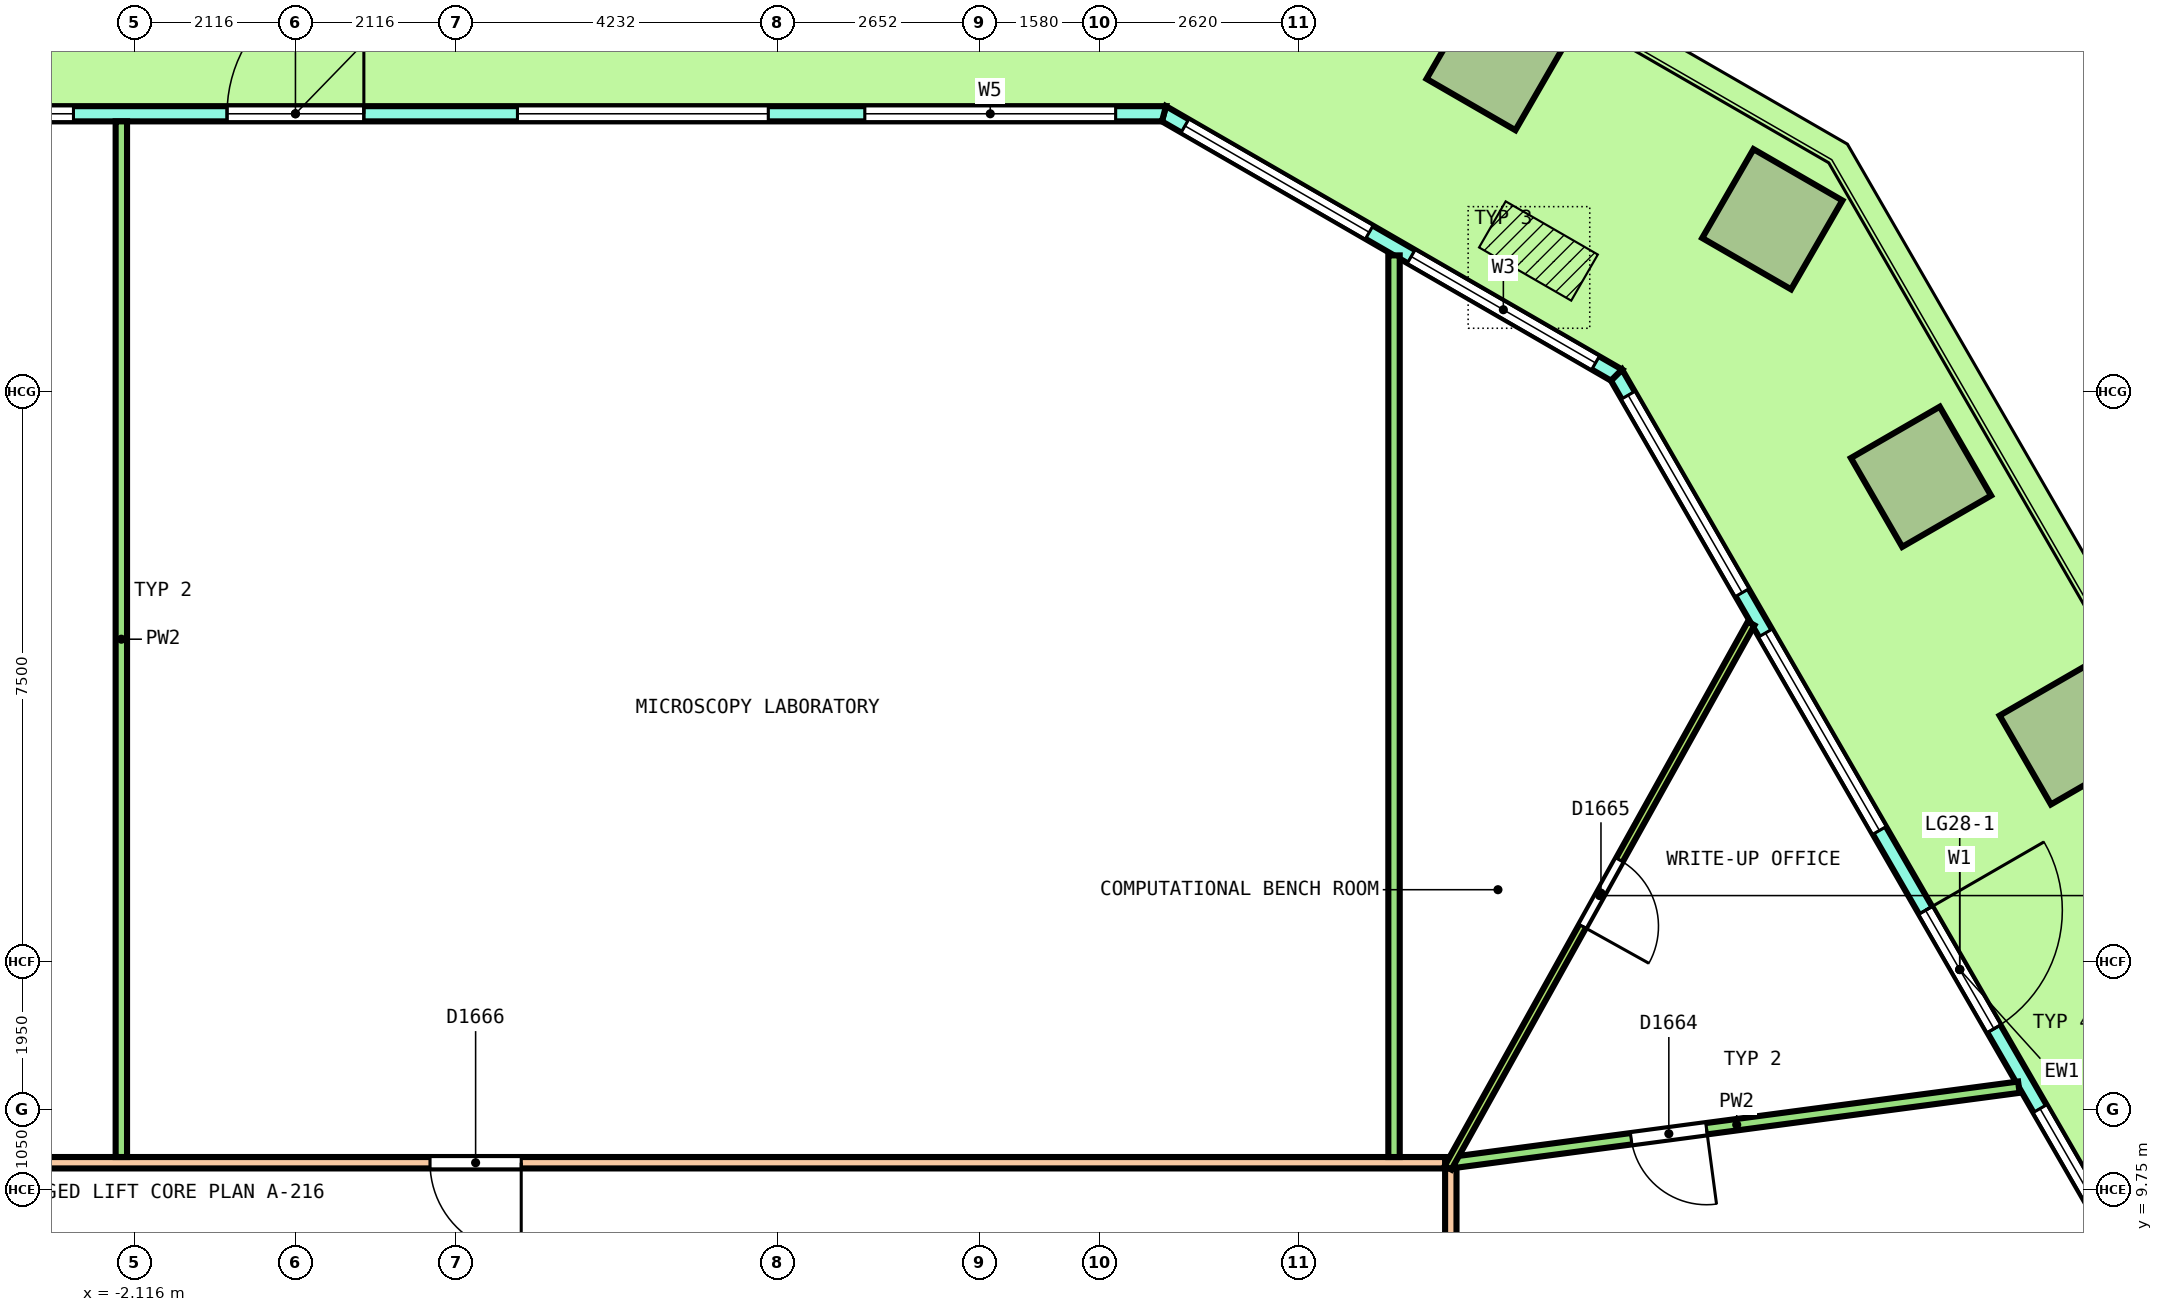
"""IFC4 building model, lengths in metres.
Left out: names, types, materials, properties, quantities, classifications, styles, units other than length and angle.
Written with IfcOpenShell. Run it as: python <this file> out.ifc"""

import sys

from ifc_helpers import new_model, si_unit, direction, frame, frame_2d, origin, origin_2d, place, context, subcontext, project, spatial, polyline, rectangle, outline, extrude, element, fill, save


model = new_model("IFC4")
c1 = context("Model", 3, precision=1e-05, world=origin(), true_north=direction((0.0, 1.0)))
c2 = subcontext(c1, "Body", "Model", "MODEL_VIEW")
j1 = project(units=[si_unit("LENGTHUNIT", "METRE"), si_unit("PLANEANGLEUNIT", "RADIAN")], contexts=[c1])
p1 = place(None, origin())
s1 = spatial("IfcSite", under=j1, at=p1, CompositionType="ELEMENT")
p2 = place(p1, origin())
s2 = spatial("IfcBuilding", under=s1, at=p2, CompositionType="ELEMENT")
p3 = place(p2, frame((0.0, 0.0, 130.8)))
s3 = spatial("IfcBuildingStorey", under=s2, at=p3, CompositionType="ELEMENT", Elevation=130.8)
for number, where, z_axis, x_axis in (
    (1, (23.342, 15.736, 0.0), (0.0, 0.0, 1.0), (-0.5, 0.866, 0.0)),
    (2, (21.386, 19.124, 0.0), (0.0, 0.0, 1.0), (-0.5, 0.866, 0.0)),
    (3, (19.43, 22.512, 0.0), (0.0, 0.0, 1.0), (-0.866, 0.5, 0.0)),
    (4, (15.803, 24.606, 0.0), (0.0, 0.0, 1.0), (-0.866, 0.5, 0.0)),
):
    element("IfcColumn", number, at=place(p3, frame(where, z_axis=z_axis, x_axis=x_axis)), inside=s3, PredefinedType="COLUMN", context=c2, shape_type="SweptSolid", body=[
        extrude(rectangle(XDim=1.35, YDim=1.35, at=origin_2d()), origin(), (0.0, 0.0, 1.0), 4.04),
    ])
p4 = place(p3, frame((26.411, 4.82, 0.0), z_axis=(0.0, 0.0, 1.0), x_axis=(-0.500000137386, 0.866025324465, 0.0)))
e5 = element("IfcWall", 5, at=p4, inside=s3, PredefinedType="SOLIDWALL", context=c2, shape_type="SweptSolid", body=[
    extrude(outline(polyline([(-0.027, -0.1), (0.979, -0.1), (1.986, -0.1), (2.992, -0.1), (3.999, -0.1), (5.005, -0.1), (6.012, -0.1), (7.018, -0.1), (8.025, -0.1), (9.031, -0.1), (10.038, -0.1), (11.044, -0.1), (12.051, -0.1), (13.057, -0.1), (14.063, -0.1), (15.07, -0.1), (16.076, -0.1), (17.083, -0.1), (18.089, -0.1), (18.036, 0.1), (17.035, 0.1), (16.035, 0.1), (15.034, 0.1), (14.034, 0.1), (13.033, 0.1), (12.033, 0.1), (11.032, 0.1), (10.032, 0.1), (9.031, 0.1), (8.031, 0.1), (7.03, 0.1), (6.03, 0.1), (5.029, 0.1), (4.029, 0.1), (3.028, 0.1), (2.028, 0.1), (1.027, 0.1), (0.027, 0.1), (-0.027, -0.1)])), origin(), (0.0, 0.0, 1.0), 4.1),
])
p5 = place(p4, frame((0.306, 0.0, 0.1)))
e6 = element("IfcOpeningElement", 6, at=p5, cuts=e5, PredefinedType="OPENING", context=c2, shape_type="SweptSolid", body=[
    extrude(rectangle(XDim=3.0, YDim=2.9, at=frame_2d((1.5, 1.45))), frame((0.0, 0.11, 0.0), z_axis=(0.0, -1.0, 0.0), x_axis=(1.0, 0.0, 0.0)), (0.0, 0.0, 1.0), 0.22),
])
p6 = place(p4, frame((3.919, 0.0, 0.1)))
e7 = element("IfcOpeningElement", 7, at=p6, cuts=e5, PredefinedType="OPENING", context=c2, shape_type="SweptSolid", body=[
    extrude(rectangle(XDim=3.0, YDim=2.9, at=frame_2d((1.5, 1.45))), frame((0.0, 0.11, 0.0), z_axis=(0.0, -1.0, 0.0), x_axis=(1.0, 0.0, 0.0)), (0.0, 0.0, 1.0), 0.22),
])
p7 = place(p4, frame((8.131, 0.0, 0.0)))
e8 = element("IfcOpeningElement", 8, at=p7, cuts=e5, PredefinedType="OPENING", context=c2, shape_type="SweptSolid", body=[
    extrude(rectangle(XDim=1.8, YDim=2.4, at=frame_2d((0.9, 1.2))), frame((0.0, 0.11, 0.0), z_axis=(0.0, -1.0, 0.0), x_axis=(1.0, 0.0, 0.0)), (0.0, 0.0, 1.0), 0.22),
])
p8 = place(p4, frame((8.131, 0.0, 2.55)))
e9 = element("IfcOpeningElement", 9, at=p8, cuts=e5, PredefinedType="OPENING", context=c2, shape_type="SweptSolid", body=[
    extrude(rectangle(XDim=1.8, YDim=0.45, at=frame_2d((0.9, 0.225))), frame((0.0, 0.11, 0.0), z_axis=(0.0, -1.0, 0.0), x_axis=(1.0, 0.0, 0.0)), (0.0, 0.0, 1.0), 0.22),
])
p9 = place(p4, frame((11.144, 0.0, 0.1)))
e10 = element("IfcOpeningElement", 10, at=p9, cuts=e5, PredefinedType="OPENING", context=c2, shape_type="SweptSolid", body=[
    extrude(rectangle(XDim=3.0, YDim=2.9, at=frame_2d((1.5, 1.45))), frame((0.0, 0.11, 0.0), z_axis=(0.0, -1.0, 0.0), x_axis=(1.0, 0.0, 0.0)), (0.0, 0.0, 1.0), 0.22),
])
p10 = place(p4, frame((14.756, 0.0, 0.1)))
e11 = element("IfcOpeningElement", 11, at=p10, cuts=e5, PredefinedType="OPENING", context=c2, shape_type="SweptSolid", body=[
    extrude(rectangle(XDim=3.0, YDim=2.9, at=frame_2d((1.5, 1.45))), frame((0.0, 0.11, 0.0), z_axis=(0.0, -1.0, 0.0), x_axis=(1.0, 0.0, 0.0)), (0.0, 0.0, 1.0), 0.22),
])
p11 = place(p3, frame((17.38, 20.463, 0.0), z_axis=(0.0, 0.0, 1.0), x_axis=(-0.866029458321, 0.49999297727, 0.0)))
e12 = element("IfcWall", 12, at=p11, inside=s3, PredefinedType="SOLIDWALL", context=c2, shape_type="SweptSolid", body=[
    extrude(outline(polyline([(-0.027, -0.1), (1.128, -0.1), (2.282, -0.1), (3.437, -0.1), (4.592, -0.1), (5.747, -0.1), (6.901, -0.1), (6.848, 0.1), (5.711, 0.1), (4.574, 0.1), (3.437, 0.1), (2.301, 0.1), (1.164, 0.1), (0.027, 0.1), (-0.027, -0.1)])), origin(), (0.0, 0.0, 1.0), 4.1),
])
p12 = place(p11, frame((0.319, 0.0, 0.1)))
e13 = element("IfcOpeningElement", 13, at=p12, cuts=e12, PredefinedType="OPENING", context=c2, shape_type="SweptSolid", body=[
    extrude(rectangle(XDim=2.8, YDim=2.9, at=frame_2d((1.4, 1.45))), frame((0.0, 0.11, 0.0), z_axis=(0.0, -1.0, 0.0), x_axis=(1.0, 0.0, 0.0)), (0.0, 0.0, 1.0), 0.22),
])
p13 = place(p11, frame((3.756, 0.0, 0.1)))
e14 = element("IfcOpeningElement", 14, at=p13, cuts=e12, PredefinedType="OPENING", context=c2, shape_type="SweptSolid", body=[
    extrude(rectangle(XDim=2.8, YDim=2.9, at=frame_2d((1.4, 1.45))), frame((0.0, 0.11, 0.0), z_axis=(0.0, -1.0, 0.0), x_axis=(1.0, 0.0, 0.0)), (0.0, 0.0, 1.0), 0.22),
])
p14 = place(p3, frame((11.426, 23.9, 0.0), z_axis=(0.0, 0.0, 1.0), x_axis=(-1.0, 0.0, 0.0)))
e15 = element("IfcWall", 15, at=p14, inside=s3, PredefinedType="SOLIDWALL", context=c2, shape_type="SweptSolid", body=[
    extrude(outline(polyline([(-0.027, -0.1), (1.014, -0.1), (2.055, -0.1), (3.097, -0.1), (4.138, -0.1), (5.179, -0.1), (6.22, -0.1), (7.261, -0.1), (8.303, -0.1), (9.344, -0.1), (10.385, -0.1), (11.426, -0.1), (12.468, -0.1), (13.509, -0.1), (14.55, -0.1), (15.591, -0.1), (16.632, -0.1), (17.673, -0.1), (18.715, -0.1), (19.756, -0.1), (20.797, -0.1), (21.838, -0.1), (22.879, -0.1), (22.826, 0.1), (21.789, 0.1), (20.753, 0.1), (19.717, 0.1), (18.68, 0.1), (17.644, 0.1), (16.608, 0.1), (15.572, 0.1), (14.535, 0.1), (13.499, 0.1), (12.463, 0.1), (11.426, 0.1), (10.39, 0.1), (9.354, 0.1), (8.317, 0.1), (7.281, 0.1), (6.245, 0.1), (5.208, 0.1), (4.172, 0.1), (3.136, 0.1), (2.099, 0.1), (1.063, 0.1), (0.027, 0.1), (-0.027, -0.1)])), origin(), (0.0, 0.0, 1.0), 4.1),
])
p15 = place(p14, frame((0.635, 0.0, 0.1)))
e16 = element("IfcOpeningElement", 16, at=p15, cuts=e15, PredefinedType="OPENING", context=c2, shape_type="SweptSolid", body=[
    extrude(rectangle(XDim=3.3, YDim=2.9, at=frame_2d((1.65, 1.45))), frame((0.0, 0.11, 0.0), z_axis=(0.0, -1.0, 0.0), x_axis=(1.0, 0.0, 0.0)), (0.0, 0.0, 1.0), 0.22),
])
p16 = place(p14, frame((5.206, 0.0, 0.1)))
e17 = element("IfcOpeningElement", 17, at=p16, cuts=e15, PredefinedType="OPENING", context=c2, shape_type="SweptSolid", body=[
    extrude(rectangle(XDim=3.3, YDim=2.9, at=frame_2d((1.65, 1.45))), frame((0.0, 0.11, 0.0), z_axis=(0.0, -1.0, 0.0), x_axis=(1.0, 0.0, 0.0)), (0.0, 0.0, 1.0), 0.22),
])
p17 = place(p14, frame((10.526, 0.0, 0.0)))
e18 = element("IfcOpeningElement", 18, at=p17, cuts=e15, PredefinedType="OPENING", context=c2, shape_type="SweptSolid", body=[
    extrude(rectangle(XDim=1.8, YDim=2.4, at=frame_2d((0.9, 1.2))), frame((0.0, 0.11, 0.0), z_axis=(0.0, -1.0, 0.0), x_axis=(1.0, 0.0, 0.0)), (0.0, 0.0, 1.0), 0.22),
])
p18 = place(p14, frame((10.526, 0.0, 2.55)))
e19 = element("IfcOpeningElement", 19, at=p18, cuts=e15, PredefinedType="OPENING", context=c2, shape_type="SweptSolid", body=[
    extrude(rectangle(XDim=1.8, YDim=0.45, at=frame_2d((0.9, 0.225))), frame((0.0, 0.11, 0.0), z_axis=(0.0, -1.0, 0.0), x_axis=(1.0, 0.0, 0.0)), (0.0, 0.0, 1.0), 0.22),
])
p19 = place(p14, frame((14.347, 0.0, 0.1)))
e20 = element("IfcOpeningElement", 20, at=p19, cuts=e15, PredefinedType="OPENING", context=c2, shape_type="SweptSolid", body=[
    extrude(rectangle(XDim=3.3, YDim=2.9, at=frame_2d((1.65, 1.45))), frame((0.0, 0.11, 0.0), z_axis=(0.0, -1.0, 0.0), x_axis=(1.0, 0.0, 0.0)), (0.0, 0.0, 1.0), 0.22),
])
p20 = place(p14, frame((18.917, 0.0, 0.1)))
e21 = element("IfcOpeningElement", 21, at=p20, cuts=e15, PredefinedType="OPENING", context=c2, shape_type="SweptSolid", body=[
    extrude(rectangle(XDim=3.3, YDim=2.9, at=frame_2d((1.65, 1.45))), frame((0.0, 0.11, 0.0), z_axis=(0.0, -1.0, 0.0), x_axis=(1.0, 0.0, 0.0)), (0.0, 0.0, 1.0), 0.22),
])
p21 = place(p3, frame((15.2, 0.576, 0.0), z_axis=(0.0, 0.0, 1.0), x_axis=(0.0, 1.0, 0.0)))
e22 = element("IfcWall", 22, at=p21, inside=s3, PredefinedType="PARTITIONING", context=c2, shape_type="SweptSolid", body=[
    extrude(rectangle(XDim=9.449, YDim=0.15, at=frame_2d((4.725, 0.0))), origin(), (0.0, 0.0, 1.0), 3.05),
])
p22 = place(p3, frame((-15.125, 10.1, 0.0), z_axis=(0.0, 0.0, 1.0), x_axis=(1.0, 0.0, 0.0)))
e23 = element("IfcWall", 23, at=p22, inside=s3, PredefinedType="PARTITIONING", context=c2, shape_type="SweptSolid", body=[
    extrude(rectangle(XDim=30.25, YDim=0.15, at=frame_2d((15.125, 0.0))), origin(), (0.0, 0.0, 1.0), 3.05),
])
p23 = place(p22, frame((16.895, 0.0, 0.0)))
e24 = element("IfcOpeningElement", 24, at=p23, cuts=e23, PredefinedType="OPENING", context=c2, shape_type="SweptSolid", body=[
    extrude(rectangle(XDim=1.2, YDim=2.1, at=frame_2d((0.6, 1.05))), frame((0.0, 0.085, 0.0), z_axis=(0.0, -1.0, 0.0), x_axis=(1.0, 0.0, 0.0)), (0.0, 0.0, 1.0), 0.17),
])
p24 = place(p22, frame((6.564, 0.0, 0.0)))
e25 = element("IfcOpeningElement", 25, at=p24, cuts=e23, PredefinedType="OPENING", context=c2, shape_type="SweptSolid", body=[
    extrude(rectangle(XDim=1.2, YDim=2.1, at=frame_2d((0.6, 1.05))), frame((0.0, 0.085, 0.0), z_axis=(0.0, -1.0, 0.0), x_axis=(1.0, 0.0, 0.0)), (0.0, 0.0, 1.0), 0.17),
])
p25 = place(p22, frame((1.476, 0.0, 0.0)))
e26 = element("IfcOpeningElement", 26, at=p25, cuts=e23, PredefinedType="OPENING", context=c2, shape_type="SweptSolid", body=[
    extrude(rectangle(XDim=1.2, YDim=2.1, at=frame_2d((0.6, 1.05))), frame((0.0, 0.085, 0.0), z_axis=(0.0, -1.0, 0.0), x_axis=(1.0, 0.0, 0.0)), (0.0, 0.0, 1.0), 0.17),
])
p26 = place(p3, frame((15.25, 10.107, 0.0), z_axis=(0.0, 0.0, 1.0), x_axis=(0.991272259153, 0.131830604315, 0.0)))
e27 = element("IfcWall", 27, at=p26, inside=s3, PredefinedType="PARTITIONING", context=c2, shape_type="SweptSolid", body=[
    extrude(rectangle(XDim=7.489, YDim=0.15, at=frame_2d((3.745, 0.0))), origin(), (0.0, 0.0, 1.0), 3.05),
])
p27 = place(p26, frame((2.344, 0.0, 0.0)))
e28 = element("IfcOpeningElement", 28, at=p27, cuts=e27, PredefinedType="OPENING", context=c2, shape_type="SweptSolid", body=[
    extrude(rectangle(XDim=1.0, YDim=2.1, at=frame_2d((0.5, 1.05))), frame((0.0, 0.085, 0.0), z_axis=(0.0, -1.0, 0.0), x_axis=(1.0, 0.0, 0.0)), (0.0, 0.0, 1.0), 0.17),
])
p28 = place(p3, frame((14.453, 10.175, 0.0), z_axis=(0.0, 0.0, 1.0), x_axis=(0.0, 1.0, 0.0)))
e29 = element("IfcWall", 29, at=p28, inside=s3, PredefinedType="PARTITIONING", context=c2, shape_type="SweptSolid", body=[
    extrude(rectangle(XDim=11.862, YDim=0.15, at=frame_2d((5.931, 0.0))), origin(), (0.0, 0.0, 1.0), 3.05),
])
p29 = place(p3, frame((-2.291, 10.175, 0.0), z_axis=(0.0, 0.0, 1.0), x_axis=(0.0, 1.0, 0.0)))
e30 = element("IfcWall", 30, at=p29, inside=s3, PredefinedType="PARTITIONING", context=c2, shape_type="SweptSolid", body=[
    extrude(rectangle(XDim=13.625, YDim=0.15, at=frame_2d((6.812, 0.0))), origin(), (0.0, 0.0, 1.0), 3.05),
])
p30 = place(p3, frame((15.164, 10.034, 0.0), z_axis=(0.0, 0.0, 1.0), x_axis=(0.486568356271, 0.873642509655, 0.0)))
e31 = element("IfcWall", 31, at=p30, inside=s3, PredefinedType="PARTITIONING", context=c2, shape_type="SweptSolid", body=[
    extrude(rectangle(XDim=8.196, YDim=0.1, at=frame_2d((4.098, 0.0))), origin(), (0.0, 0.0, 1.0), 3.05),
])
p31 = place(p30, frame((3.635, 0.0, 0.0)))
e32 = element("IfcOpeningElement", 32, at=p31, cuts=e31, PredefinedType="OPENING", context=c2, shape_type="SweptSolid", body=[
    extrude(rectangle(XDim=1.0, YDim=2.1, at=frame_2d((0.5, 1.05))), frame((0.0, 0.06, 0.0), z_axis=(0.0, -1.0, 0.0), x_axis=(1.0, 0.0, 0.0)), (0.0, 0.0, 1.0), 0.12),
])
p32 = place(p6, origin())
e33 = element("IfcWindow", 33, at=p32, inside=s3, PartitioningType="SINGLE_PANEL", PredefinedType="WINDOW", context=c2, shape_type="SweptSolid", body=[
    extrude(rectangle(XDim=3.0, YDim=2.9, at=frame_2d((1.5, 1.45))), frame((0.0, 0.03, 0.0), z_axis=(0.0, -1.0, 0.0), x_axis=(1.0, 0.0, 0.0)), (0.0, 0.0, 1.0), 0.06),
])
fill(e7, e33)
p33 = place(p7, origin())
e34 = element("IfcDoor", 34, at=p33, inside=s3, OperationType="DOUBLE_DOOR_SINGLE_SWING", PredefinedType="DOOR", context=c2, shape_type="SweptSolid", body=[
    extrude(rectangle(XDim=1.8, YDim=2.4, at=frame_2d((0.9, 1.2))), frame((0.0, 0.025, 0.0), z_axis=(0.0, -1.0, 0.0), x_axis=(1.0, 0.0, 0.0)), (0.0, 0.0, 1.0), 0.05),
])
fill(e8, e34)
p34 = place(p8, origin())
e35 = element("IfcWindow", 35, at=p34, inside=s3, PartitioningType="SINGLE_PANEL", PredefinedType="WINDOW", context=c2, shape_type="SweptSolid", body=[
    extrude(rectangle(XDim=1.8, YDim=0.45, at=frame_2d((0.9, 0.225))), frame((0.0, 0.03, 0.0), z_axis=(0.0, -1.0, 0.0), x_axis=(1.0, 0.0, 0.0)), (0.0, 0.0, 1.0), 0.06),
])
fill(e9, e35)
p35 = place(p9, origin())
e36 = element("IfcWindow", 36, at=p35, inside=s3, PartitioningType="SINGLE_PANEL", PredefinedType="WINDOW", context=c2, shape_type="SweptSolid", body=[
    extrude(rectangle(XDim=3.0, YDim=2.9, at=frame_2d((1.5, 1.45))), frame((0.0, 0.03, 0.0), z_axis=(0.0, -1.0, 0.0), x_axis=(1.0, 0.0, 0.0)), (0.0, 0.0, 1.0), 0.06),
])
fill(e10, e36)
p36 = place(p10, origin())
e37 = element("IfcWindow", 37, at=p36, inside=s3, PartitioningType="SINGLE_PANEL", PredefinedType="WINDOW", context=c2, shape_type="SweptSolid", body=[
    extrude(rectangle(XDim=3.0, YDim=2.9, at=frame_2d((1.5, 1.45))), frame((0.0, 0.03, 0.0), z_axis=(0.0, -1.0, 0.0), x_axis=(1.0, 0.0, 0.0)), (0.0, 0.0, 1.0), 0.06),
])
fill(e11, e37)
p37 = place(p12, origin())
e38 = element("IfcWindow", 38, at=p37, inside=s3, PartitioningType="SINGLE_PANEL", PredefinedType="WINDOW", context=c2, shape_type="SweptSolid", body=[
    extrude(rectangle(XDim=2.8, YDim=2.9, at=frame_2d((1.4, 1.45))), frame((0.0, 0.03, 0.0), z_axis=(0.0, -1.0, 0.0), x_axis=(1.0, 0.0, 0.0)), (0.0, 0.0, 1.0), 0.06),
])
fill(e13, e38)
p38 = place(p13, origin())
e39 = element("IfcWindow", 39, at=p38, inside=s3, PartitioningType="SINGLE_PANEL", PredefinedType="WINDOW", context=c2, shape_type="SweptSolid", body=[
    extrude(rectangle(XDim=2.8, YDim=2.9, at=frame_2d((1.4, 1.45))), frame((0.0, 0.03, 0.0), z_axis=(0.0, -1.0, 0.0), x_axis=(1.0, 0.0, 0.0)), (0.0, 0.0, 1.0), 0.06),
])
fill(e14, e39)
p39 = place(p15, origin())
e40 = element("IfcWindow", 40, at=p39, inside=s3, PartitioningType="SINGLE_PANEL", PredefinedType="WINDOW", context=c2, shape_type="SweptSolid", body=[
    extrude(rectangle(XDim=3.3, YDim=2.9, at=frame_2d((1.65, 1.45))), frame((0.0, 0.03, 0.0), z_axis=(0.0, -1.0, 0.0), x_axis=(1.0, 0.0, 0.0)), (0.0, 0.0, 1.0), 0.06),
])
fill(e16, e40)
p40 = place(p16, origin())
e41 = element("IfcWindow", 41, at=p40, inside=s3, PartitioningType="SINGLE_PANEL", PredefinedType="WINDOW", context=c2, shape_type="SweptSolid", body=[
    extrude(rectangle(XDim=3.3, YDim=2.9, at=frame_2d((1.65, 1.45))), frame((0.0, 0.03, 0.0), z_axis=(0.0, -1.0, 0.0), x_axis=(1.0, 0.0, 0.0)), (0.0, 0.0, 1.0), 0.06),
])
fill(e17, e41)
p41 = place(p17, origin())
e42 = element("IfcDoor", 42, at=p41, inside=s3, OperationType="DOUBLE_DOOR_SINGLE_SWING", PredefinedType="DOOR", context=c2, shape_type="SweptSolid", body=[
    extrude(rectangle(XDim=1.8, YDim=2.4, at=frame_2d((0.9, 1.2))), frame((0.0, 0.025, 0.0), z_axis=(0.0, -1.0, 0.0), x_axis=(1.0, 0.0, 0.0)), (0.0, 0.0, 1.0), 0.05),
])
fill(e18, e42)
p42 = place(p18, origin())
e43 = element("IfcWindow", 43, at=p42, inside=s3, PartitioningType="SINGLE_PANEL", PredefinedType="WINDOW", context=c2, shape_type="SweptSolid", body=[
    extrude(rectangle(XDim=1.8, YDim=0.45, at=frame_2d((0.9, 0.225))), frame((0.0, 0.03, 0.0), z_axis=(0.0, -1.0, 0.0), x_axis=(1.0, 0.0, 0.0)), (0.0, 0.0, 1.0), 0.06),
])
fill(e19, e43)
p43 = place(p19, origin())
e44 = element("IfcWindow", 44, at=p43, inside=s3, PartitioningType="SINGLE_PANEL", PredefinedType="WINDOW", context=c2, shape_type="SweptSolid", body=[
    extrude(rectangle(XDim=3.3, YDim=2.9, at=frame_2d((1.65, 1.45))), frame((0.0, 0.03, 0.0), z_axis=(0.0, -1.0, 0.0), x_axis=(1.0, 0.0, 0.0)), (0.0, 0.0, 1.0), 0.06),
])
fill(e20, e44)
p44 = place(p27, origin())
e45 = element("IfcDoor", 45, at=p44, inside=s3, OperationType="SINGLE_SWING_RIGHT", PredefinedType="DOOR", context=c2, shape_type="SweptSolid", body=[
    extrude(rectangle(XDim=1.0, YDim=2.1, at=frame_2d((0.5, 1.05))), frame((0.0, 0.025, 0.0), z_axis=(0.0, -1.0, 0.0), x_axis=(1.0, 0.0, 0.0)), (0.0, 0.0, 1.0), 0.05),
])
fill(e28, e45)
p45 = place(p31, origin())
e46 = element("IfcDoor", 46, at=p45, inside=s3, OperationType="SINGLE_SWING_LEFT", PredefinedType="DOOR", context=c2, shape_type="SweptSolid", body=[
    extrude(rectangle(XDim=1.0, YDim=2.1, at=frame_2d((0.5, 1.05))), frame((0.0, 0.025, 0.0), z_axis=(0.0, -1.0, 0.0), x_axis=(1.0, 0.0, 0.0)), (0.0, 0.0, 1.0), 0.05),
])
fill(e32, e46)
p46 = place(p23, origin())
e47 = element("IfcDoor", 47, at=p46, inside=s3, OperationType="DOUBLE_DOOR_SINGLE_SWING", PredefinedType="DOOR", context=c2, shape_type="SweptSolid", body=[
    extrude(rectangle(XDim=1.2, YDim=2.1, at=frame_2d((0.6, 1.05))), frame((0.0, 0.025, 0.0), z_axis=(0.0, -1.0, 0.0), x_axis=(1.0, 0.0, 0.0)), (0.0, 0.0, 1.0), 0.05),
])
fill(e24, e47)
save(model, sys.argv[1])
